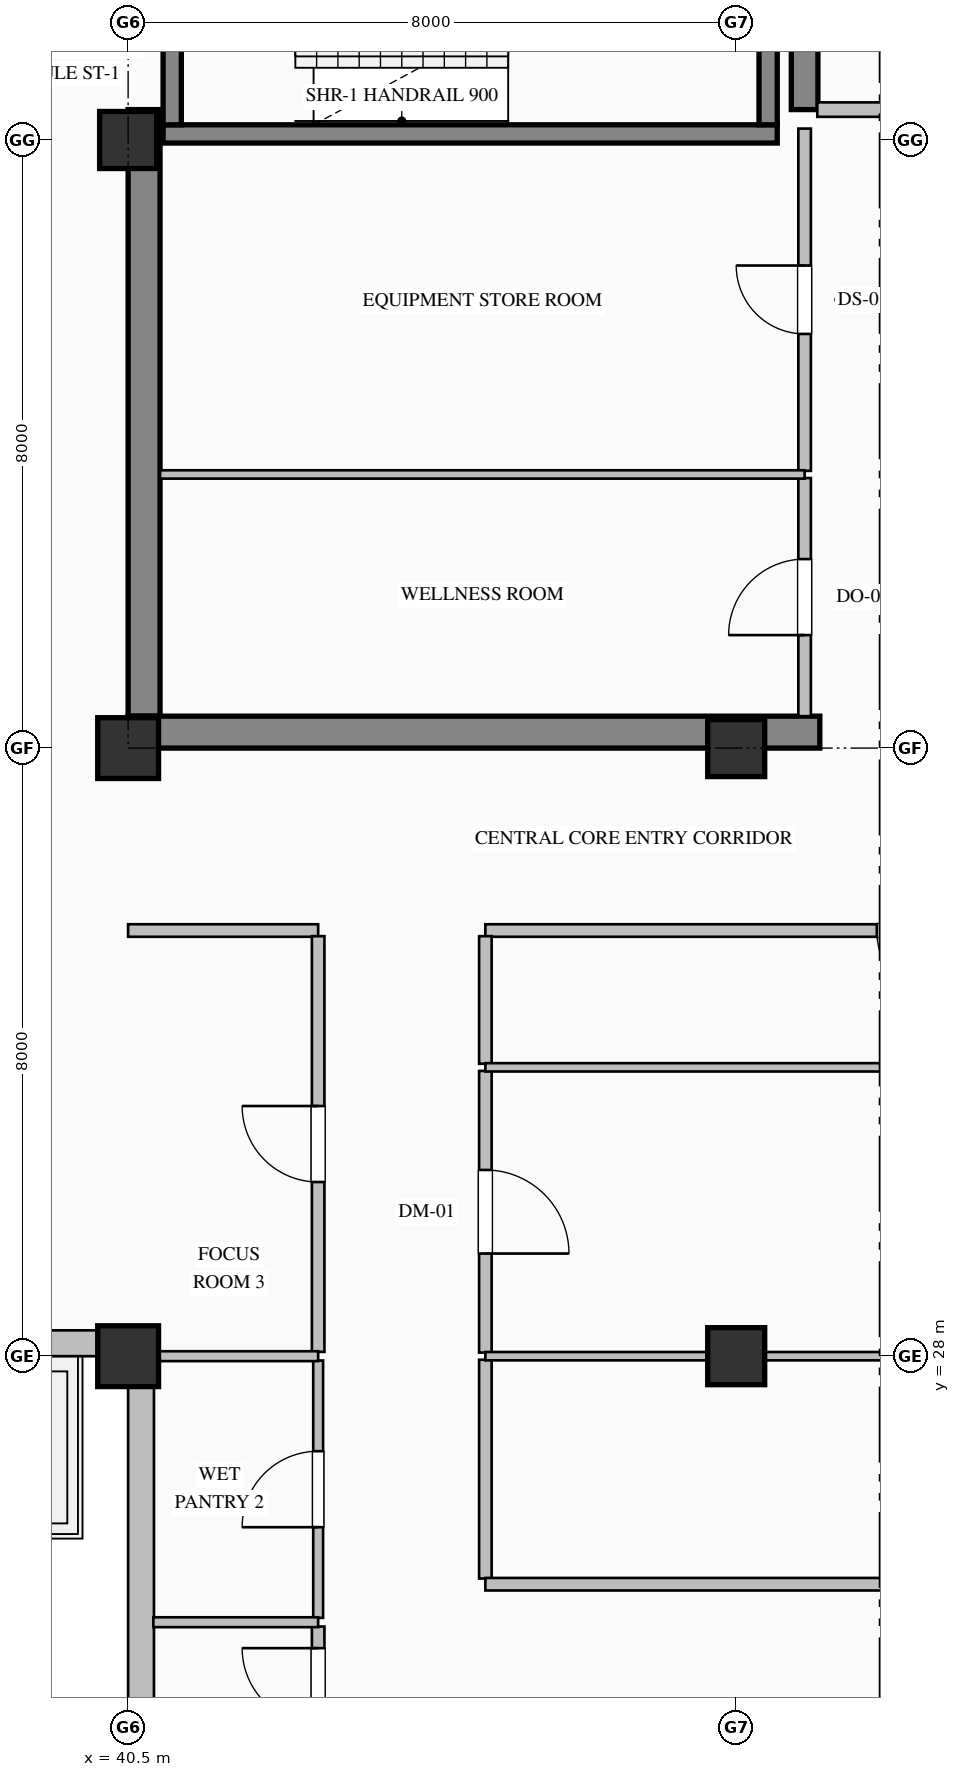
"""IFC4 building model, lengths in metres.
Left out: names, types, materials, properties, quantities, classifications, styles, units other than length and angle.
Written with IfcOpenShell. Run it as: python <this file> out.ifc"""

import sys

from ifc_helpers import new_model, si_unit, direction, frame, frame_2d, origin, origin_2d, place, context, subcontext, project, spatial, rectangle, hollow_rectangle, extrude, element, fill, save


model = new_model("IFC4")
c1 = context("Model", 3, precision=1e-05, world=origin(), true_north=direction((0.0, 1.0)))
c2 = subcontext(c1, "Body", "Model", "MODEL_VIEW")
j1 = project(units=[si_unit("LENGTHUNIT", "METRE"), si_unit("PLANEANGLEUNIT", "RADIAN")], contexts=[c1])
p1 = place(None, origin())
s1 = spatial("IfcSite", under=j1, at=p1, CompositionType="ELEMENT")
p2 = place(p1, origin())
s2 = spatial("IfcBuilding", under=s1, at=p2, CompositionType="ELEMENT")
p3 = place(p2, frame((0.0, 0.0, 295.2)))
s3 = spatial("IfcBuildingStorey", under=s2, at=p3, CompositionType="ELEMENT", Elevation=295.2)
p4 = place(p3, frame((40.71, 36.42, 0.0), z_axis=(0.0, 0.0, 1.0), x_axis=(0.0, 1.0, 0.0)))
e1 = element("IfcWall", 1, at=p4, inside=s3, PredefinedType="SHEAR", context=c2, shape_type="SweptSolid", body=[
    extrude(rectangle(XDim=7.98, YDim=0.42, at=frame_2d((3.99, 0.0))), origin(), (0.0, 0.0, 1.0), 3.785),
])
p5 = place(p3, frame((40.5, 36.21, 0.0), z_axis=(0.0, 0.0, 1.0), x_axis=(1.0, 0.0, 0.0)))
e2 = element("IfcWall", 2, at=p5, inside=s3, PredefinedType="SHEAR", context=c2, shape_type="SweptSolid", body=[
    extrude(rectangle(XDim=9.1, YDim=0.42, at=frame_2d((4.55, 0.0))), origin(), (0.0, 0.0, 1.0), 3.785),
])
p6 = place(p3, frame((49.4, 44.4, 0.0), z_axis=(0.0, 0.0, 1.0), x_axis=(0.0, 1.0, 0.0)))
e3 = element("IfcWall", 3, at=p6, inside=s3, PredefinedType="SHEAR", context=c2, shape_type="SweptSolid", body=[
    extrude(rectangle(XDim=3.0, YDim=0.35, at=frame_2d((1.5, 0.0))), origin(), (0.0, 0.0, 1.0), 3.785),
])
for number, where, z_axis, x_axis in (
    (4, (40.5, 28.0, 0.0), (0.0, 0.0, 1.0), (1.0, 0.0, 0.0)),
    (5, (40.5, 36.0, 0.0), (0.0, 0.0, 1.0), (1.0, 0.0, 0.0)),
):
    element("IfcColumn", number, at=place(p3, frame(where, z_axis=z_axis, x_axis=x_axis)), inside=s3, PredefinedType="COLUMN", context=c2, shape_type="SweptSolid", body=[
        extrude(hollow_rectangle(XDim=0.8, YDim=0.8, WallThickness=0.032, at=origin_2d()), origin(), (0.0, 0.0, 1.0), 4.0),
    ])
for number, where, z_axis, x_axis in (
    (6, (40.5, 44.0, 0.0), (0.0, 0.0, 1.0), (1.0, 0.0, 0.0)),
    (7, (48.5, 28.0, 0.0), (0.0, 0.0, 1.0), (1.0, 0.0, 0.0)),
    (8, (48.5, 36.0, 0.0), (0.0, 0.0, 1.0), (1.0, 0.0, 0.0)),
):
    element("IfcColumn", number, at=place(p3, frame(where, z_axis=z_axis, x_axis=x_axis)), inside=s3, PredefinedType="COLUMN", context=c2, shape_type="SweptSolid", body=[
        extrude(rectangle(XDim=0.75, YDim=0.75, at=origin_2d()), origin(), (0.0, 0.0, 1.0), 4.0),
    ])
p7 = place(p3, frame((40.67, 22.5, 0.0), z_axis=(0.0, 0.0, 1.0), x_axis=(0.0, 1.0, 0.0)))
e9 = element("IfcWall", 9, at=p7, inside=s3, PredefinedType="SOLIDWALL", context=c2, shape_type="SweptSolid", body=[
    extrude(rectangle(XDim=5.84, YDim=0.34, at=frame_2d((2.92, 0.0))), origin(), (0.0, 0.0, 1.0), 3.185),
])
p8 = place(p3, frame((40.52, 28.17, 0.0), z_axis=(0.0, 0.0, 1.0), x_axis=(-1.0, 0.0, 0.0)))
e10 = element("IfcWall", 10, at=p8, inside=s3, PredefinedType="SOLIDWALL", context=c2, shape_type="SweptSolid", body=[
    extrude(rectangle(XDim=20.02, YDim=0.34, at=frame_2d((10.01, 0.0))), origin(), (0.0, 0.0, 1.0), 3.185),
])
p9 = place(p8, frame((3.125, 0.0, 0.9)))
e11 = element("IfcOpeningElement", 11, at=p9, cuts=e10, PredefinedType="OPENING", context=c2, shape_type="SweptSolid", body=[
    extrude(rectangle(XDim=0.95, YDim=1.85, at=frame_2d((0.475, 0.925))), frame((0.0, 0.18, 0.0), z_axis=(0.0, -1.0, 0.0), x_axis=(1.0, 0.0, 0.0)), (0.0, 0.0, 1.0), 0.36),
])
p10 = place(p8, frame((13.925, 0.0, 0.9)))
e12 = element("IfcOpeningElement", 12, at=p10, cuts=e10, PredefinedType="OPENING", context=c2, shape_type="SweptSolid", body=[
    extrude(rectangle(XDim=0.95, YDim=1.85, at=frame_2d((0.475, 0.925))), frame((0.0, 0.18, 0.0), z_axis=(0.0, -1.0, 0.0), x_axis=(1.0, 0.0, 0.0)), (0.0, 0.0, 1.0), 0.36),
])
p11 = place(p8, frame((11.395, 0.0, 0.0)))
e13 = element("IfcOpeningElement", 13, at=p11, cuts=e10, PredefinedType="OPENING", context=c2, shape_type="SweptSolid", body=[
    extrude(rectangle(XDim=1.25, YDim=2.25, at=frame_2d((0.625, 1.125))), frame((0.0, 0.18, 0.0), z_axis=(0.0, -1.0, 0.0), x_axis=(1.0, 0.0, 0.0)), (0.0, 0.0, 1.0), 0.36),
])
p12 = place(p3, frame((49.04, 44.08, 0.0), z_axis=(0.0, 0.0, 1.0), x_axis=(-1.0, 0.0, 0.0)))
e14 = element("IfcWall", 14, at=p12, inside=s3, PredefinedType="SOLIDWALL", context=c2, shape_type="SweptSolid", body=[
    extrude(rectangle(XDim=8.08, YDim=0.24, at=frame_2d((4.04, 0.0))), origin(), (0.0, 0.0, 1.0), 4.0),
])
p13 = place(p3, frame((41.08, 47.35, 0.0), z_axis=(0.0, 0.0, 1.0), x_axis=(0.0, -1.0, 0.0)))
e15 = element("IfcWall", 15, at=p13, inside=s3, PredefinedType="SOLIDWALL", context=c2, shape_type="SweptSolid", body=[
    extrude(rectangle(XDim=3.15, YDim=0.24, at=frame_2d((1.575, 0.0))), origin(), (0.0, 0.0, 1.0), 4.0),
])
p14 = place(p13, frame((1.0, 0.0, 0.0)))
e16 = element("IfcOpeningElement", 16, at=p14, cuts=e15, PredefinedType="OPENING", context=c2, shape_type="SweptSolid", body=[
    extrude(rectangle(XDim=1.15, YDim=2.2, at=frame_2d((0.575, 1.1))), frame((0.0, 0.13, 0.0), z_axis=(0.0, -1.0, 0.0), x_axis=(1.0, 0.0, 0.0)), (0.0, 0.0, 1.0), 0.26),
])
p15 = place(p3, frame((48.92, 44.2, 0.0), z_axis=(0.0, 0.0, 1.0), x_axis=(0.0, 1.0, 0.0)))
e17 = element("IfcWall", 17, at=p15, inside=s3, PredefinedType="SOLIDWALL", context=c2, shape_type="SweptSolid", body=[
    extrude(rectangle(XDim=3.15, YDim=0.24, at=frame_2d((1.575, 0.0))), origin(), (0.0, 0.0, 1.0), 4.0),
])
p16 = place(p3, frame((54.733, 44.4, 0.0), z_axis=(0.0, 0.0, 1.0), x_axis=(-1.0, 0.0, 0.0)))
e18 = element("IfcWall", 18, at=p16, inside=s3, PredefinedType="PARTITIONING", context=c2, shape_type="SweptSolid", body=[
    extrude(rectangle(XDim=5.166, YDim=0.19, at=frame_2d((2.583, 0.0))), origin(), (0.0, 0.0, 1.0), 3.785),
])
p17 = place(p16, frame((2.058, 0.0, 0.0)))
e19 = element("IfcOpeningElement", 19, at=p17, cuts=e18, PredefinedType="OPENING", context=c2, shape_type="SweptSolid", body=[
    extrude(rectangle(XDim=1.05, YDim=2.15, at=frame_2d((0.525, 1.075))), frame((0.0, 0.105, 0.0), z_axis=(0.0, -1.0, 0.0), x_axis=(1.0, 0.0, 0.0)), (0.0, 0.0, 1.0), 0.21),
])
p18 = place(p3, frame((49.4, 36.42, 0.0), z_axis=(0.0, 0.0, 1.0), x_axis=(0.0, 1.0, 0.0)))
e20 = element("IfcWall", 20, at=p18, inside=s3, PredefinedType="PARTITIONING", context=c2, shape_type="SweptSolid", body=[
    extrude(rectangle(XDim=3.133, YDim=0.165, at=frame_2d((1.566, 0.0))), origin(), (0.0, 0.0, 1.0), 3.027),
])
p19 = place(p18, frame((1.066, 0.0, 0.0)))
e21 = element("IfcOpeningElement", 21, at=p19, cuts=e20, PredefinedType="OPENING", context=c2, shape_type="SweptSolid", body=[
    extrude(rectangle(XDim=1.0, YDim=2.15, at=frame_2d((0.5, 1.075))), frame((0.0, 0.093, 0.0), z_axis=(0.0, -1.0, 0.0), x_axis=(1.0, 0.0, 0.0)), (0.0, 0.0, 1.0), 0.185),
])
p20 = place(p3, frame((49.4, 39.647, 0.0), z_axis=(0.0, 0.0, 1.0), x_axis=(0.0, 1.0, 0.0)))
e22 = element("IfcWall", 22, at=p20, inside=s3, PredefinedType="PARTITIONING", context=c2, shape_type="SweptSolid", body=[
    extrude(rectangle(XDim=4.503, YDim=0.165, at=frame_2d((2.251, 0.0))), origin(), (0.0, 0.0, 1.0), 3.027),
])
p21 = place(p20, frame((1.802, 0.0, 0.0)))
e23 = element("IfcOpeningElement", 23, at=p21, cuts=e22, PredefinedType="OPENING", context=c2, shape_type="SweptSolid", body=[
    extrude(rectangle(XDim=0.9, YDim=2.15, at=frame_2d((0.45, 1.075))), frame((0.0, 0.093, 0.0), z_axis=(0.0, -1.0, 0.0), x_axis=(1.0, 0.0, 0.0)), (0.0, 0.0, 1.0), 0.185),
])
p22 = place(p3, frame((40.92, 39.6, 0.0), z_axis=(0.0, 0.0, 1.0), x_axis=(1.0, 0.0, 0.0)))
e24 = element("IfcWall", 24, at=p22, inside=s3, PredefinedType="MOVABLE", context=c2, shape_type="SweptSolid", body=[
    extrude(rectangle(XDim=8.48, YDim=0.11, at=frame_2d((4.24, 0.0))), origin(), (0.0, 0.0, 1.0), 3.785),
])
p23 = place(p3, frame((56.5, 33.6, 0.0), z_axis=(0.0, 0.0, 1.0), x_axis=(-1.0, 0.0, 0.0)))
e25 = element("IfcWall", 25, at=p23, inside=s3, PredefinedType="PARTITIONING", context=c2, shape_type="SweptSolid", body=[
    extrude(rectangle(XDim=11.3, YDim=0.165, at=frame_2d((5.65, 0.0))), origin(), (0.0, 0.0, 1.0), 3.785),
])
p24 = place(p23, frame((5.15, 0.0, 0.0)))
e26 = element("IfcOpeningElement", 26, at=p24, cuts=e25, PredefinedType="OPENING", context=c2, shape_type="SweptSolid", body=[
    extrude(rectangle(XDim=1.0, YDim=2.15, at=frame_2d((0.5, 1.075))), frame((0.0, 0.093, 0.0), z_axis=(0.0, -1.0, 0.0), x_axis=(1.0, 0.0, 0.0)), (0.0, 0.0, 1.0), 0.185),
])
p25 = place(p3, frame((43.0, 33.6, 0.0), z_axis=(0.0, 0.0, 1.0), x_axis=(-1.0, 0.0, 0.0)))
e27 = element("IfcWall", 27, at=p25, inside=s3, PredefinedType="PARTITIONING", context=c2, shape_type="SweptSolid", body=[
    extrude(rectangle(XDim=2.5, YDim=0.165, at=frame_2d((1.25, 0.0))), origin(), (0.0, 0.0, 1.0), 3.785),
])
p26 = place(p3, frame((45.2, 27.953, 0.0), z_axis=(0.0, 0.0, 1.0), x_axis=(0.0, -1.0, 0.0)))
e28 = element("IfcWall", 28, at=p26, inside=s3, PredefinedType="PARTITIONING", context=c2, shape_type="SweptSolid", body=[
    extrude(rectangle(XDim=2.878, YDim=0.165, at=frame_2d((1.439, 0.0))), origin(), (0.0, 0.0, 1.0), 3.785),
])
p27 = place(p3, frame((45.2, 31.753, 0.0), z_axis=(0.0, 0.0, 1.0), x_axis=(0.0, -1.0, 0.0)))
e29 = element("IfcWall", 29, at=p27, inside=s3, PredefinedType="PARTITIONING", context=c2, shape_type="SweptSolid", body=[
    extrude(rectangle(XDim=3.706, YDim=0.165, at=frame_2d((1.853, 0.0))), origin(), (0.0, 0.0, 1.0), 3.785),
])
p28 = place(p27, frame((1.303, 0.0, 0.0)))
e30 = element("IfcOpeningElement", 30, at=p28, cuts=e29, PredefinedType="OPENING", context=c2, shape_type="SweptSolid", body=[
    extrude(rectangle(XDim=1.1, YDim=2.2, at=frame_2d((0.55, 1.1))), frame((0.0, 0.093, 0.0), z_axis=(0.0, -1.0, 0.0), x_axis=(1.0, 0.0, 0.0)), (0.0, 0.0, 1.0), 0.185),
])
p29 = place(p3, frame((45.2, 33.525, 0.0), z_axis=(0.0, 0.0, 1.0), x_axis=(0.0, -1.0, 0.0)))
e31 = element("IfcWall", 31, at=p29, inside=s3, PredefinedType="PARTITIONING", context=c2, shape_type="SweptSolid", body=[
    extrude(rectangle(XDim=1.678, YDim=0.165, at=frame_2d((0.839, 0.0))), origin(), (0.0, 0.0, 1.0), 3.785),
])
p30 = place(p3, frame((43.0, 22.875, 0.0), z_axis=(0.0, 0.0, 1.0), x_axis=(0.0, 1.0, 0.0)))
e32 = element("IfcWall", 32, at=p30, inside=s3, PredefinedType="PARTITIONING", context=c2, shape_type="SweptSolid", body=[
    extrude(rectangle(XDim=1.569, YDim=0.165, at=frame_2d((0.784, 0.0))), origin(), (0.0, 0.0, 1.0), 3.785),
])
p31 = place(p30, frame((0.284, 0.0, 0.0)))
e33 = element("IfcOpeningElement", 33, at=p31, cuts=e32, PredefinedType="OPENING", context=c2, shape_type="SweptSolid", body=[
    extrude(rectangle(XDim=1.0, YDim=2.15, at=frame_2d((0.5, 1.075))), frame((0.0, 0.093, 0.0), z_axis=(0.0, -1.0, 0.0), x_axis=(1.0, 0.0, 0.0)), (0.0, 0.0, 1.0), 0.185),
])
p32 = place(p3, frame((43.0, 24.557, 0.0), z_axis=(0.0, 0.0, 1.0), x_axis=(0.0, 1.0, 0.0)))
e34 = element("IfcWall", 34, at=p32, inside=s3, PredefinedType="PARTITIONING", context=c2, shape_type="SweptSolid", body=[
    extrude(rectangle(XDim=3.386, YDim=0.13, at=frame_2d((1.693, 0.0))), origin(), (0.0, 0.0, 1.0), 3.785),
])
p33 = place(p32, frame((1.193, 0.0, 0.0)))
e35 = element("IfcOpeningElement", 35, at=p33, cuts=e34, PredefinedType="OPENING", context=c2, shape_type="SweptSolid", body=[
    extrude(rectangle(XDim=1.0, YDim=2.15, at=frame_2d((0.5, 1.075))), frame((0.0, 0.075, 0.0), z_axis=(0.0, -1.0, 0.0), x_axis=(1.0, 0.0, 0.0)), (0.0, 0.0, 1.0), 0.15),
])
p34 = place(p3, frame((43.0, 28.057, 0.0), z_axis=(0.0, 0.0, 1.0), x_axis=(0.0, 1.0, 0.0)))
e36 = element("IfcWall", 36, at=p34, inside=s3, PredefinedType="PARTITIONING", context=c2, shape_type="SweptSolid", body=[
    extrude(rectangle(XDim=5.469, YDim=0.165, at=frame_2d((2.734, 0.0))), origin(), (0.0, 0.0, 1.0), 3.785),
])
p35 = place(p34, frame((2.234, 0.0, 0.0)))
e37 = element("IfcOpeningElement", 37, at=p35, cuts=e36, PredefinedType="OPENING", context=c2, shape_type="SweptSolid", body=[
    extrude(rectangle(XDim=1.0, YDim=2.15, at=frame_2d((0.5, 1.075))), frame((0.0, 0.093, 0.0), z_axis=(0.0, -1.0, 0.0), x_axis=(1.0, 0.0, 0.0)), (0.0, 0.0, 1.0), 0.185),
])
p36 = place(p3, frame((45.2, 25.0, 0.0), z_axis=(0.0, 0.0, 1.0), x_axis=(1.0, 0.0, 0.0)))
e38 = element("IfcWall", 38, at=p36, inside=s3, PredefinedType="PARTITIONING", context=c2, shape_type="SweptSolid", body=[
    extrude(rectangle(XDim=16.3, YDim=0.165, at=frame_2d((8.15, 0.0))), origin(), (0.0, 0.0, 1.0), 3.785),
])
p37 = place(p36, frame((7.65, 0.0, 0.0)))
e39 = element("IfcOpeningElement", 39, at=p37, cuts=e38, PredefinedType="OPENING", context=c2, shape_type="SweptSolid", body=[
    extrude(rectangle(XDim=1.0, YDim=2.15, at=frame_2d((0.5, 1.075))), frame((0.0, 0.093, 0.0), z_axis=(0.0, -1.0, 0.0), x_axis=(1.0, 0.0, 0.0)), (0.0, 0.0, 1.0), 0.185),
])
p38 = place(p3, frame((45.2, 28.0, 0.0), z_axis=(0.0, 0.0, 1.0), x_axis=(1.0, 0.0, 0.0)))
e40 = element("IfcWall", 40, at=p38, inside=s3, PredefinedType="MOVABLE", context=c2, shape_type="SweptSolid", body=[
    extrude(rectangle(XDim=18.528, YDim=0.11, at=frame_2d((9.264, 0.0))), origin(), (0.0, 0.0, 1.0), 3.177),
])
p39 = place(p3, frame((45.2, 31.8, 0.0), z_axis=(0.0, 0.0, 1.0), x_axis=(1.0, 0.0, 0.0)))
e41 = element("IfcWall", 41, at=p39, inside=s3, PredefinedType="MOVABLE", context=c2, shape_type="SweptSolid", body=[
    extrude(rectangle(XDim=18.528, YDim=0.11, at=frame_2d((9.264, 0.0))), origin(), (0.0, 0.0, 1.0), 3.785),
])
p40 = place(p3, frame((40.832, 24.5, 0.0), z_axis=(0.0, 0.0, 1.0), x_axis=(1.0, 0.0, 0.0)))
e42 = element("IfcWall", 42, at=p40, inside=s3, PredefinedType="PARTITIONING", context=c2, shape_type="SweptSolid", body=[
    extrude(rectangle(XDim=2.168, YDim=0.13, at=frame_2d((1.084, 0.0))), origin(), (0.0, 0.0, 1.0), 3.785),
])
p41 = place(p3, frame((40.832, 28.0, 0.0), z_axis=(0.0, 0.0, 1.0), x_axis=(1.0, 0.0, 0.0)))
e43 = element("IfcWall", 43, at=p41, inside=s3, PredefinedType="PARTITIONING", context=c2, shape_type="SweptSolid", body=[
    extrude(rectangle(XDim=2.168, YDim=0.13, at=frame_2d((1.084, 0.0))), origin(), (0.0, 0.0, 1.0), 3.177),
])
p42 = place(p19, origin())
e44 = element("IfcDoor", 44, at=p42, inside=s3, OperationType="SINGLE_SWING_LEFT", PredefinedType="DOOR", context=c2, shape_type="SweptSolid", body=[
    extrude(rectangle(XDim=1.0, YDim=2.15, at=frame_2d((0.5, 1.075))), frame((0.0, 0.025, 0.0), z_axis=(0.0, -1.0, 0.0), x_axis=(1.0, 0.0, 0.0)), (0.0, 0.0, 1.0), 0.05),
])
fill(e21, e44)
p43 = place(p21, origin())
e45 = element("IfcDoor", 45, at=p43, inside=s3, OperationType="SINGLE_SWING_RIGHT", PredefinedType="DOOR", context=c2, shape_type="SweptSolid", body=[
    extrude(rectangle(XDim=0.9, YDim=2.15, at=frame_2d((0.45, 1.075))), frame((0.0, 0.025, 0.0), z_axis=(0.0, -1.0, 0.0), x_axis=(1.0, 0.0, 0.0)), (0.0, 0.0, 1.0), 0.05),
])
fill(e23, e45)
p44 = place(p28, origin())
e46 = element("IfcDoor", 46, at=p44, inside=s3, OperationType="SINGLE_SWING_RIGHT", PredefinedType="DOOR", context=c2, shape_type="SweptSolid", body=[
    extrude(rectangle(XDim=1.1, YDim=2.2, at=frame_2d((0.55, 1.1))), frame((0.0, 0.025, 0.0), z_axis=(0.0, -1.0, 0.0), x_axis=(1.0, 0.0, 0.0)), (0.0, 0.0, 1.0), 0.05),
])
fill(e30, e46)
p45 = place(p24, origin())
e47 = element("IfcDoor", 47, at=p45, inside=s3, OperationType="SINGLE_SWING_LEFT", PredefinedType="DOOR", context=c2, shape_type="SweptSolid", body=[
    extrude(rectangle(XDim=1.0, YDim=2.15, at=frame_2d((0.5, 1.075))), frame((0.0, 0.025, 0.0), z_axis=(0.0, -1.0, 0.0), x_axis=(1.0, 0.0, 0.0)), (0.0, 0.0, 1.0), 0.05),
])
fill(e26, e47)
p46 = place(p31, origin())
e48 = element("IfcDoor", 48, at=p46, inside=s3, OperationType="SINGLE_SWING_RIGHT", PredefinedType="DOOR", context=c2, shape_type="SweptSolid", body=[
    extrude(rectangle(XDim=1.0, YDim=2.15, at=frame_2d((0.5, 1.075))), frame((0.0, 0.025, 0.0), z_axis=(0.0, -1.0, 0.0), x_axis=(1.0, 0.0, 0.0)), (0.0, 0.0, 1.0), 0.05),
])
fill(e33, e48)
p47 = place(p33, origin())
e49 = element("IfcDoor", 49, at=p47, inside=s3, OperationType="SINGLE_SWING_LEFT", PredefinedType="DOOR", context=c2, shape_type="SweptSolid", body=[
    extrude(rectangle(XDim=1.0, YDim=2.15, at=frame_2d((0.5, 1.075))), frame((0.0, 0.025, 0.0), z_axis=(0.0, -1.0, 0.0), x_axis=(1.0, 0.0, 0.0)), (0.0, 0.0, 1.0), 0.05),
])
fill(e35, e49)
p48 = place(p35, origin())
e50 = element("IfcDoor", 50, at=p48, inside=s3, OperationType="SINGLE_SWING_RIGHT", PredefinedType="DOOR", context=c2, shape_type="SweptSolid", body=[
    extrude(rectangle(XDim=1.0, YDim=2.15, at=frame_2d((0.5, 1.075))), frame((0.0, 0.025, 0.0), z_axis=(0.0, -1.0, 0.0), x_axis=(1.0, 0.0, 0.0)), (0.0, 0.0, 1.0), 0.05),
])
fill(e37, e50)
save(model, sys.argv[1])
